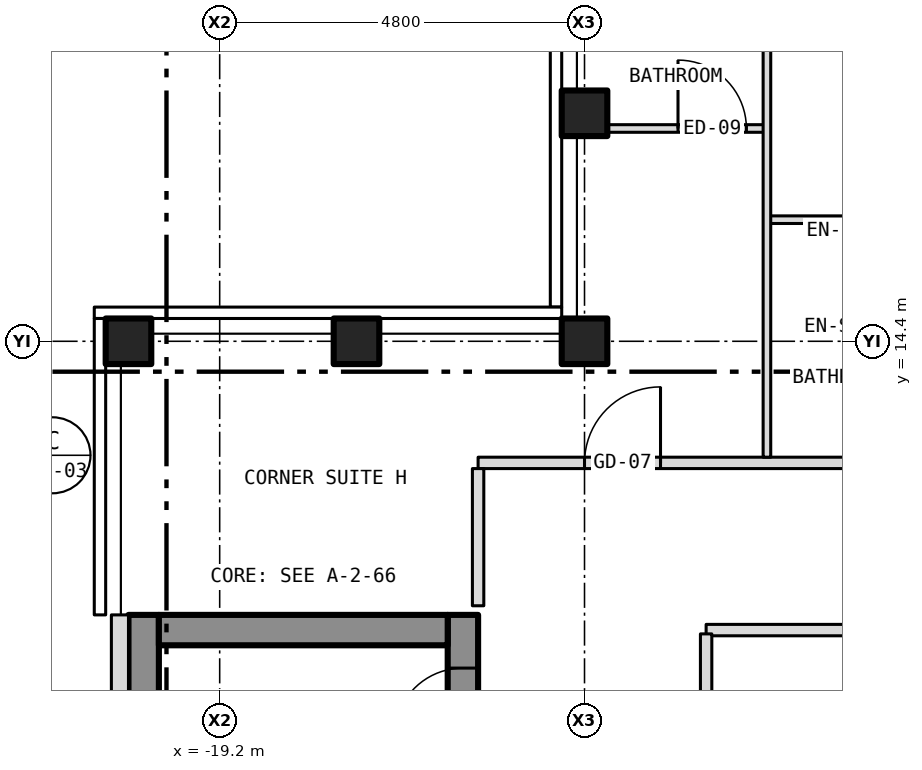
"""IFC4 building model, lengths in metres.
Left out: names, types, materials, properties, quantities, classifications, styles, units other than length and angle.
Written with IfcOpenShell. Run it as: python <this file> out.ifc"""

import sys

from ifc_helpers import new_model, si_unit, direction, frame, frame_2d, origin, origin_2d, place, context, subcontext, project, spatial, rectangle, hollow_rectangle, extrude, element, fill, save


model = new_model("IFC4")
c1 = context("Model", 3, precision=1e-05, world=origin(), true_north=direction((0.0, 1.0)))
c2 = subcontext(c1, "Body", "Model", "MODEL_VIEW")
j1 = project(units=[si_unit("LENGTHUNIT", "METRE"), si_unit("PLANEANGLEUNIT", "RADIAN")], contexts=[c1])
p1 = place(None, origin())
s1 = spatial("IfcSite", under=j1, at=p1, CompositionType="ELEMENT")
p2 = place(p1, origin())
s2 = spatial("IfcBuilding", under=s1, at=p2, CompositionType="ELEMENT")
p3 = place(p2, frame((0.0, 0.0, 241.0)))
s3 = spatial("IfcBuildingStorey", under=s2, at=p3, CompositionType="ELEMENT", Elevation=241.0)
for number, where, z_axis, x_axis in (
    (1, (-20.4, 14.4, -0.15), (0.0, 0.0, 1.0), (1.0, 0.0, 0.0)),
    (2, (-14.4, 14.4, -0.15), (0.0, 0.0, 1.0), (1.0, 0.0, 0.0)),
    (3, (-14.4, 17.4, -0.15), (0.0, 0.0, 1.0), (1.0, 0.0, 0.0)),
    (4, (-17.4, 14.4, -0.15), (0.0, 0.0, 1.0), (1.0, 0.0, 0.0)),
):
    element("IfcColumn", number, at=place(p3, frame(where, z_axis=z_axis, x_axis=x_axis)), inside=s3, PredefinedType="COLUMN", context=c2, shape_type="SweptSolid", body=[
        extrude(hollow_rectangle(XDim=0.6, YDim=0.6, WallThickness=0.03, at=origin_2d()), origin(), (0.0, 0.0, 1.0), 3.5),
    ])
p4 = place(p3, frame((-16.0, -10.8, 0.0), z_axis=(0.0, 0.0, 1.0), x_axis=(0.0, 1.0, 0.0)))
e5 = element("IfcWall", 5, at=p4, inside=s3, PredefinedType="SHEAR", context=c2, shape_type="SweptSolid", body=[
    extrude(rectangle(XDim=21.6, YDim=0.4, at=frame_2d((10.8, 0.0))), origin(), (0.0, 0.0, 1.0), 3.25),
])
p5 = place(p4, frame((9.4, 0.0, 0.0)))
e6 = element("IfcOpeningElement", 6, at=p5, cuts=e5, PredefinedType="OPENING", context=c2, shape_type="SweptSolid", body=[
    extrude(rectangle(XDim=1.1, YDim=2.1, at=frame_2d((0.55, 1.05))), frame((0.0, 0.212, 0.0), z_axis=(0.0, -1.0, 0.0), x_axis=(1.0, 0.0, 0.0)), (0.0, 0.0, 1.0), 0.424),
])
p6 = place(p4, frame((11.5, 0.0, 0.0)))
e7 = element("IfcOpeningElement", 7, at=p6, cuts=e5, PredefinedType="OPENING", context=c2, shape_type="SweptSolid", body=[
    extrude(rectangle(XDim=1.1, YDim=2.1, at=frame_2d((0.55, 1.05))), frame((0.0, 0.212, 0.0), z_axis=(0.0, -1.0, 0.0), x_axis=(1.0, 0.0, 0.0)), (0.0, 0.0, 1.0), 0.424),
])
p7 = place(p4, frame((13.6, 0.0, 0.0)))
e8 = element("IfcOpeningElement", 8, at=p7, cuts=e5, PredefinedType="OPENING", context=c2, shape_type="SweptSolid", body=[
    extrude(rectangle(XDim=1.1, YDim=2.1, at=frame_2d((0.55, 1.05))), frame((0.0, 0.212, 0.0), z_axis=(0.0, -1.0, 0.0), x_axis=(1.0, 0.0, 0.0)), (0.0, 0.0, 1.0), 0.424),
])
p8 = place(p4, frame((15.7, 0.0, 0.0)))
e9 = element("IfcOpeningElement", 9, at=p8, cuts=e5, PredefinedType="OPENING", context=c2, shape_type="SweptSolid", body=[
    extrude(rectangle(XDim=1.1, YDim=2.1, at=frame_2d((0.55, 1.05))), frame((0.0, 0.212, 0.0), z_axis=(0.0, -1.0, 0.0), x_axis=(1.0, 0.0, 0.0)), (0.0, 0.0, 1.0), 0.424),
])
p9 = place(p4, frame((17.8, 0.0, 0.0)))
e10 = element("IfcOpeningElement", 10, at=p9, cuts=e5, PredefinedType="OPENING", context=c2, shape_type="SweptSolid", body=[
    extrude(rectangle(XDim=1.1, YDim=2.1, at=frame_2d((0.55, 1.05))), frame((0.0, 0.212, 0.0), z_axis=(0.0, -1.0, 0.0), x_axis=(1.0, 0.0, 0.0)), (0.0, 0.0, 1.0), 0.424),
])
p10 = place(p4, frame((0.458, 0.0, 0.0)))
e11 = element("IfcOpeningElement", 11, at=p10, cuts=e5, PredefinedType="OPENING", context=c2, shape_type="SweptSolid", body=[
    extrude(rectangle(XDim=1.1, YDim=2.1, at=frame_2d((0.55, 1.05))), frame((0.0, 0.212, 0.0), z_axis=(0.0, -1.0, 0.0), x_axis=(1.0, 0.0, 0.0)), (0.0, 0.0, 1.0), 0.424),
])
p11 = place(p4, frame((7.5, 0.0, 0.0)))
e12 = element("IfcOpeningElement", 12, at=p11, cuts=e5, PredefinedType="OPENING", context=c2, shape_type="SweptSolid", body=[
    extrude(rectangle(XDim=1.1, YDim=2.1, at=frame_2d((0.55, 1.05))), frame((0.0, 0.212, 0.0), z_axis=(0.0, -1.0, 0.0), x_axis=(1.0, 0.0, 0.0)), (0.0, 0.0, 1.0), 0.424),
])
p12 = place(p4, frame((20.0, 0.0, 0.0)))
e13 = element("IfcOpeningElement", 13, at=p12, cuts=e5, PredefinedType="OPENING", context=c2, shape_type="SweptSolid", body=[
    extrude(rectangle(XDim=0.9, YDim=2.1, at=frame_2d((0.45, 1.05))), frame((0.0, 0.212, 0.0), z_axis=(0.0, -1.0, 0.0), x_axis=(1.0, 0.0, 0.0)), (0.0, 0.0, 1.0), 0.424),
])
p13 = place(p3, frame((-20.2, -10.8, 0.0), z_axis=(0.0, 0.0, 1.0), x_axis=(0.0, 1.0, 0.0)))
e14 = element("IfcWall", 14, at=p13, inside=s3, PredefinedType="SHEAR", context=c2, shape_type="SweptSolid", body=[
    extrude(rectangle(XDim=21.6, YDim=0.4, at=frame_2d((10.8, 0.0))), origin(), (0.0, 0.0, 1.0), 3.25),
])
p14 = place(p3, frame((-20.0, 10.6, 0.0), z_axis=(0.0, 0.0, 1.0), x_axis=(1.0, 0.0, 0.0)))
e15 = element("IfcWall", 15, at=p14, inside=s3, PredefinedType="SHEAR", context=c2, shape_type="SweptSolid", body=[
    extrude(rectangle(XDim=3.8, YDim=0.4, at=frame_2d((1.9, 0.0))), origin(), (0.0, 0.0, 1.0), 3.25),
])
p15 = place(p3, frame((-20.512, 10.8, 0.0), z_axis=(0.0, 0.0, 1.0), x_axis=(0.0, -1.0, 0.0)))
e16 = element("IfcWall", 16, at=p15, inside=s3, PredefinedType="SOLIDWALL", context=c2, shape_type="SweptSolid", body=[
    extrude(rectangle(XDim=21.6, YDim=0.225, at=frame_2d((10.8, 0.0))), origin(), (0.0, 0.0, 1.0), 3.5),
])
p16 = place(p15, frame((18.05, 0.0, 1.0)))
e17 = element("IfcOpeningElement", 17, at=p16, cuts=e16, PredefinedType="OPENING", context=c2, shape_type="SweptSolid", body=[
    extrude(rectangle(XDim=0.6, YDim=1.5, at=frame_2d((0.3, 0.75))), frame((0.0, 0.125, 0.0), z_axis=(0.0, -1.0, 0.0), x_axis=(1.0, 0.0, 0.0)), (0.0, 0.0, 1.0), 0.249),
])
p17 = place(p3, frame((-12.8, 10.6, 0.0), z_axis=(0.0, 0.0, 1.0), x_axis=(1.0, 0.0, 0.0)))
e18 = element("IfcWall", 18, at=p17, inside=s3, PredefinedType="PARTITIONING", context=c2, shape_type="SweptSolid", body=[
    extrude(rectangle(XDim=20.3, YDim=0.15, at=frame_2d((10.15, 0.0))), origin(), (0.0, 0.0, 1.0), 3.35),
])
p18 = place(p17, frame((5.95, 0.0, 0.0)))
e19 = element("IfcOpeningElement", 19, at=p18, cuts=e18, PredefinedType="OPENING", context=c2, shape_type="SweptSolid", body=[
    extrude(rectangle(XDim=0.9, YDim=2.1, at=frame_2d((0.45, 1.05))), frame((0.0, 0.087, 0.0), z_axis=(0.0, -1.0, 0.0), x_axis=(1.0, 0.0, 0.0)), (0.0, 0.0, 1.0), 0.174),
])
p19 = place(p3, frame((-15.8, 12.8, 0.0), z_axis=(0.0, 0.0, 1.0), x_axis=(1.0, 0.0, 0.0)))
e20 = element("IfcWall", 20, at=p19, inside=s3, PredefinedType="PARTITIONING", context=c2, shape_type="SweptSolid", body=[
    extrude(rectangle(XDim=31.6, YDim=0.15, at=frame_2d((15.8, 0.0))), origin(), (0.0, 0.0, 1.0), 3.35),
])
p20 = place(p19, frame((6.8, 0.0, 0.0)))
e21 = element("IfcOpeningElement", 21, at=p20, cuts=e20, PredefinedType="OPENING", context=c2, shape_type="SweptSolid", body=[
    extrude(rectangle(XDim=1.0, YDim=2.1, at=frame_2d((0.5, 1.05))), frame((0.0, 0.087, 0.0), z_axis=(0.0, -1.0, 0.0), x_axis=(1.0, 0.0, 0.0)), (0.0, 0.0, 1.0), 0.174),
])
p21 = place(p19, frame((15.35, 0.0, 0.0)))
e22 = element("IfcOpeningElement", 22, at=p21, cuts=e20, PredefinedType="OPENING", context=c2, shape_type="SweptSolid", body=[
    extrude(rectangle(XDim=0.9, YDim=2.1, at=frame_2d((0.45, 1.05))), frame((0.0, 0.087, 0.0), z_axis=(0.0, -1.0, 0.0), x_axis=(1.0, 0.0, 0.0)), (0.0, 0.0, 1.0), 0.174),
])
p22 = place(p19, frame((26.0, 0.0, 0.0)))
e23 = element("IfcOpeningElement", 23, at=p22, cuts=e20, PredefinedType="OPENING", context=c2, shape_type="SweptSolid", body=[
    extrude(rectangle(XDim=1.0, YDim=2.1, at=frame_2d((0.5, 1.05))), frame((0.0, 0.087, 0.0), z_axis=(0.0, -1.0, 0.0), x_axis=(1.0, 0.0, 0.0)), (0.0, 0.0, 1.0), 0.174),
])
p23 = place(p19, frame((1.4, 0.0, 0.0)))
e24 = element("IfcOpeningElement", 24, at=p23, cuts=e20, PredefinedType="OPENING", context=c2, shape_type="SweptSolid", body=[
    extrude(rectangle(XDim=1.0, YDim=2.1, at=frame_2d((0.5, 1.05))), frame((0.0, 0.087, 0.0), z_axis=(0.0, -1.0, 0.0), x_axis=(1.0, 0.0, 0.0)), (0.0, 0.0, 1.0), 0.174),
])
p24 = place(p19, frame((29.2, 0.0, 0.0)))
e25 = element("IfcOpeningElement", 25, at=p24, cuts=e20, PredefinedType="OPENING", context=c2, shape_type="SweptSolid", body=[
    extrude(rectangle(XDim=1.0, YDim=2.1, at=frame_2d((0.5, 1.05))), frame((0.0, 0.087, 0.0), z_axis=(0.0, -1.0, 0.0), x_axis=(1.0, 0.0, 0.0)), (0.0, 0.0, 1.0), 0.174),
])
p25 = place(p3, frame((-12.0, 16.0, 0.0), z_axis=(0.0, 0.0, 1.0), x_axis=(1.0, 0.0, 0.0)))
e26 = element("IfcWall", 26, at=p25, inside=s3, PredefinedType="PARTITIONING", context=c2, shape_type="SweptSolid", body=[
    extrude(rectangle(XDim=2.2, YDim=0.1, at=frame_2d((1.1, 0.0))), origin(), (0.0, 0.0, 1.0), 3.35),
])
p26 = place(p3, frame((-14.28, 17.2, 0.0), z_axis=(0.0, 0.0, 1.0), x_axis=(1.0, 0.0, 0.0)))
e27 = element("IfcWall", 27, at=p26, inside=s3, PredefinedType="PARTITIONING", context=c2, shape_type="SweptSolid", body=[
    extrude(rectangle(XDim=2.28, YDim=0.1, at=frame_2d((1.14, 0.0))), origin(), (0.0, 0.0, 1.0), 3.35),
])
p27 = place(p26, frame((1.11, 0.0, 0.0)))
e28 = element("IfcOpeningElement", 28, at=p27, cuts=e27, PredefinedType="OPENING", context=c2, shape_type="SweptSolid", body=[
    extrude(rectangle(XDim=0.9, YDim=2.1, at=frame_2d((0.45, 1.05))), frame((0.0, 0.062, 0.0), z_axis=(0.0, -1.0, 0.0), x_axis=(1.0, 0.0, 0.0)), (0.0, 0.0, 1.0), 0.124),
])
p28 = place(p3, frame((-15.8, 10.92, 0.0), z_axis=(0.0, 0.0, 1.0), x_axis=(0.0, 1.0, 0.0)))
e29 = element("IfcWall", 29, at=p28, inside=s3, PredefinedType="PARTITIONING", context=c2, shape_type="SweptSolid", body=[
    extrude(rectangle(XDim=1.805, YDim=0.15, at=frame_2d((0.903, 0.0))), origin(), (0.0, 0.0, 1.0), 3.35),
])
p29 = place(p3, frame((-12.8, 3.375, 0.0), z_axis=(0.0, 0.0, 1.0), x_axis=(0.0, 1.0, 0.0)))
e30 = element("IfcWall", 30, at=p29, inside=s3, PredefinedType="PARTITIONING", context=c2, shape_type="SweptSolid", body=[
    extrude(rectangle(XDim=7.175, YDim=0.15, at=frame_2d((3.587, 0.0))), origin(), (0.0, 0.0, 1.0), 3.35),
])
p30 = place(p3, frame((-12.0, 12.875, 0.0), z_axis=(0.0, 0.0, 1.0), x_axis=(0.0, 1.0, 0.0)))
e31 = element("IfcWall", 31, at=p30, inside=s3, PredefinedType="PARTITIONING", context=c2, shape_type="SweptSolid", body=[
    extrude(rectangle(XDim=7.855, YDim=0.1, at=frame_2d((3.927, 0.0))), origin(), (0.0, 0.0, 1.0), 3.35),
])
p31 = place(p12, origin())
e32 = element("IfcDoor", 32, at=p31, inside=s3, OperationType="SINGLE_SWING_LEFT", PredefinedType="DOOR", context=c2, shape_type="SweptSolid", body=[
    extrude(rectangle(XDim=0.9, YDim=2.1, at=frame_2d((0.45, 1.05))), frame((0.0, 0.025, 0.0), z_axis=(0.0, -1.0, 0.0), x_axis=(1.0, 0.0, 0.0)), (0.0, 0.0, 1.0), 0.05),
])
fill(e13, e32)
p32 = place(p27, origin())
e33 = element("IfcDoor", 33, at=p32, inside=s3, OperationType="SINGLE_SWING_LEFT", PredefinedType="DOOR", context=c2, shape_type="SweptSolid", body=[
    extrude(rectangle(XDim=0.9, YDim=2.1, at=frame_2d((0.45, 1.05))), frame((0.0, 0.025, 0.0), z_axis=(0.0, -1.0, 0.0), x_axis=(1.0, 0.0, 0.0)), (0.0, 0.0, 1.0), 0.05),
])
fill(e28, e33)
p33 = place(p23, origin())
e34 = element("IfcDoor", 34, at=p33, inside=s3, OperationType="SINGLE_SWING_RIGHT", PredefinedType="DOOR", context=c2, shape_type="SweptSolid", body=[
    extrude(rectangle(XDim=1.0, YDim=2.1, at=frame_2d((0.5, 1.05))), frame((0.0, 0.025, 0.0), z_axis=(0.0, -1.0, 0.0), x_axis=(1.0, 0.0, 0.0)), (0.0, 0.0, 1.0), 0.05),
])
fill(e24, e34)
save(model, sys.argv[1])
